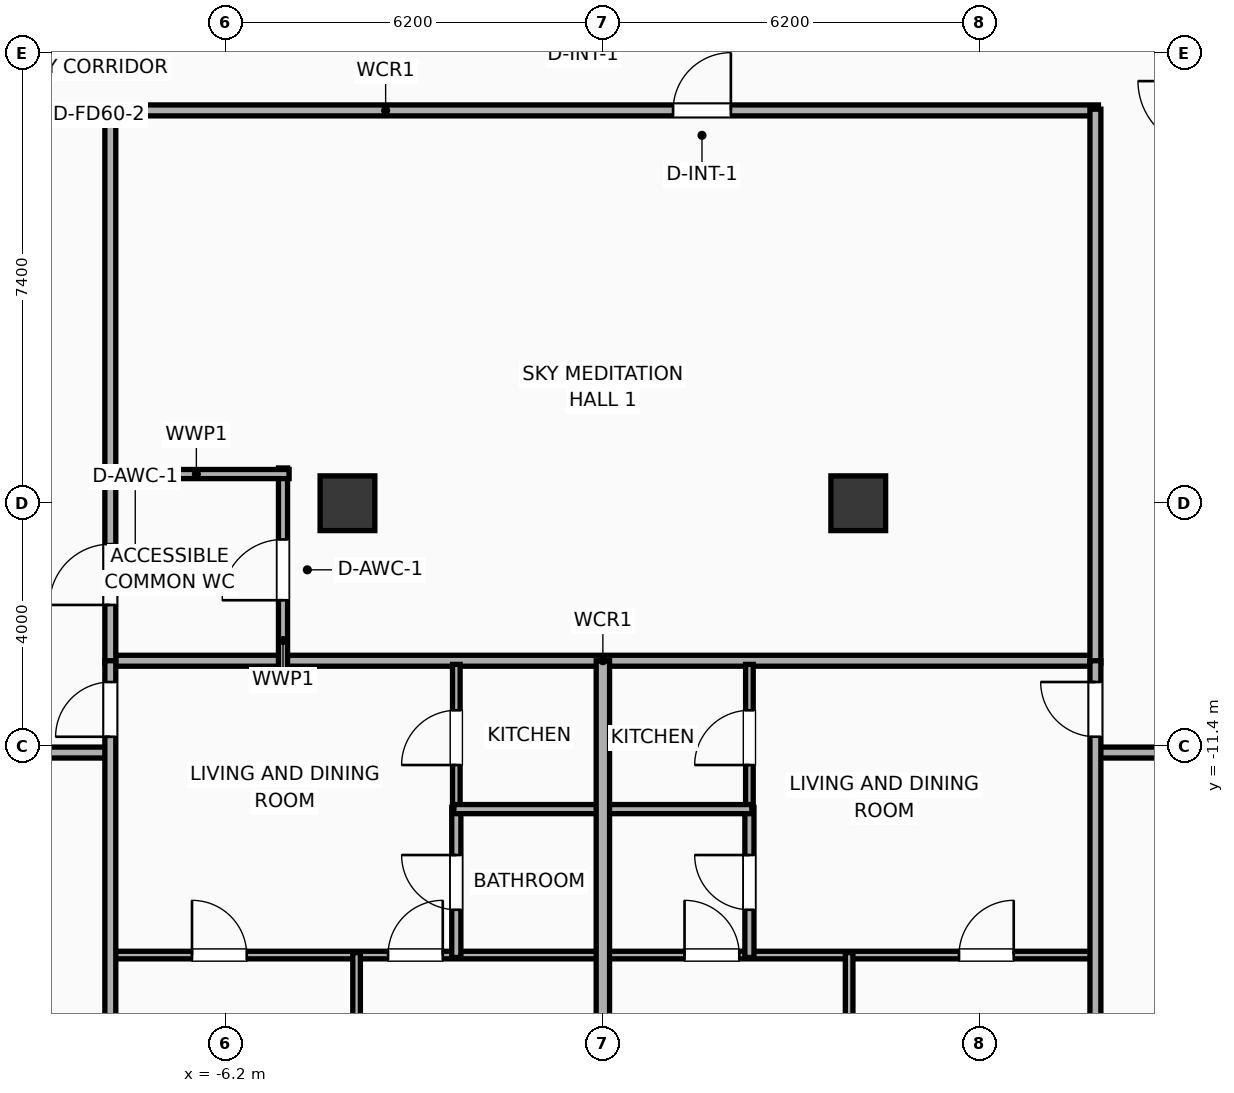
"""IFC4 building model, lengths in metres.
Left out: names, types, materials, properties, quantities, classifications, styles, units other than length and angle.
Written with IfcOpenShell. Run it as: python <this file> out.ifc"""

import sys

from ifc_helpers import new_model, si_unit, direction, frame, frame_2d, origin, origin_2d, place, context, subcontext, project, spatial, rectangle, extrude, element, fill, save


model = new_model("IFC4")
c1 = context("Model", 3, precision=1e-05, world=origin(), true_north=direction((0.0, 1.0)))
c2 = subcontext(c1, "Body", "Model", "MODEL_VIEW")
j1 = project(units=[si_unit("LENGTHUNIT", "METRE"), si_unit("PLANEANGLEUNIT", "RADIAN")], contexts=[c1])
p1 = place(None, origin())
s1 = spatial("IfcSite", under=j1, at=p1, CompositionType="ELEMENT")
p2 = place(p1, origin())
s2 = spatial("IfcBuilding", under=s1, at=p2, CompositionType="ELEMENT")
p3 = place(p2, frame((0.0, 0.0, 171.6)))
s3 = spatial("IfcBuildingStorey", under=s2, at=p3, CompositionType="ELEMENT", Elevation=171.6)
for number, where, z_axis, x_axis in (
    (1, (-4.2, -7.4, 0.0), (0.0, 0.0, 1.0), (1.0, 0.0, 0.0)),
    (2, (4.2, -7.4, 0.0), (0.0, 0.0, 1.0), (1.0, 0.0, 0.0)),
):
    element("IfcColumn", number, at=place(p3, frame(where, z_axis=z_axis, x_axis=x_axis)), inside=s3, PredefinedType="COLUMN", context=c2, shape_type="SweptSolid", body=[
        extrude(rectangle(XDim=0.9, YDim=0.9, at=origin_2d()), origin(), (0.0, 0.0, 1.0), 3.9),
    ])
p4 = place(p3, frame((-8.15, -9.99, 0.0), z_axis=(0.0, 0.0, 1.0), x_axis=(1.0, 0.0, 0.0)))
e3 = element("IfcWall", 3, at=p4, inside=s3, PredefinedType="PARTITIONING", context=c2, shape_type="SweptSolid", body=[
    extrude(rectangle(XDim=16.3, YDim=0.18, at=frame_2d((8.15, 0.0))), origin(), (0.0, 0.0, 1.0), 3.65),
])
p5 = place(p3, frame((-8.15, -0.94, 0.0), z_axis=(0.0, 0.0, 1.0), x_axis=(1.0, 0.0, 0.0)))
e4 = element("IfcWall", 4, at=p5, inside=s3, PredefinedType="PARTITIONING", context=c2, shape_type="SweptSolid", body=[
    extrude(rectangle(XDim=16.3, YDim=0.18, at=frame_2d((8.15, 0.0))), origin(), (0.0, 0.0, 1.0), 3.65),
])
p6 = place(p5, frame((9.305, 0.0, 0.0)))
e5 = element("IfcOpeningElement", 5, at=p6, cuts=e4, PredefinedType="OPENING", context=c2, shape_type="SweptSolid", body=[
    extrude(rectangle(XDim=0.95, YDim=2.05, at=frame_2d((0.475, 1.025))), frame((0.0, 0.1, 0.0), z_axis=(0.0, -1.0, 0.0), x_axis=(1.0, 0.0, 0.0)), (0.0, 0.0, 1.0), 0.2),
])
p7 = place(p3, frame((-8.1, -10.03, 0.0), z_axis=(0.0, 0.0, 1.0), x_axis=(0.0, 1.0, 0.0)))
e6 = element("IfcWall", 6, at=p7, inside=s3, PredefinedType="PARTITIONING", context=c2, shape_type="SweptSolid", body=[
    extrude(rectangle(XDim=9.11, YDim=0.18, at=frame_2d((4.555, 0.0))), origin(), (0.0, 0.0, 1.0), 3.65),
])
p8 = place(p7, frame((0.958, 0.0, 0.0)))
e7 = element("IfcOpeningElement", 7, at=p8, cuts=e6, PredefinedType="OPENING", context=c2, shape_type="SweptSolid", body=[
    extrude(rectangle(XDim=1.0, YDim=2.05, at=frame_2d((0.5, 1.025))), frame((0.0, 0.1, 0.0), z_axis=(0.0, -1.0, 0.0), x_axis=(1.0, 0.0, 0.0)), (0.0, 0.0, 1.0), 0.2),
])
p9 = place(p3, frame((8.1, -10.03, 0.0), z_axis=(0.0, 0.0, 1.0), x_axis=(0.0, 1.0, 0.0)))
e8 = element("IfcWall", 8, at=p9, inside=s3, PredefinedType="PARTITIONING", context=c2, shape_type="SweptSolid", body=[
    extrude(rectangle(XDim=9.11, YDim=0.18, at=frame_2d((4.555, 0.0))), origin(), (0.0, 0.0, 1.0), 3.65),
])
p10 = place(p3, frame((-5.26, -10.17, 0.0), z_axis=(0.0, 0.0, 1.0), x_axis=(0.0, 1.0, 0.0)))
e9 = element("IfcWall", 9, at=p10, inside=s3, PredefinedType="PLUMBINGWALL", context=c2, shape_type="SweptSolid", body=[
    extrude(rectangle(XDim=3.35, YDim=0.15, at=frame_2d((1.675, 0.0))), origin(), (0.0, 0.0, 1.0), 3.65),
])
p11 = place(p10, frame((1.175, 0.0, 0.0)))
e10 = element("IfcOpeningElement", 10, at=p11, cuts=e9, PredefinedType="OPENING", context=c2, shape_type="SweptSolid", body=[
    extrude(rectangle(XDim=1.0, YDim=2.05, at=frame_2d((0.5, 1.025))), frame((0.0, 0.085, 0.0), z_axis=(0.0, -1.0, 0.0), x_axis=(1.0, 0.0, 0.0)), (0.0, 0.0, 1.0), 0.17),
])
p12 = place(p3, frame((-8.21, -6.92, 0.0), z_axis=(0.0, 0.0, 1.0), x_axis=(1.0, 0.0, 0.0)))
e11 = element("IfcWall", 11, at=p12, inside=s3, PredefinedType="PLUMBINGWALL", context=c2, shape_type="SweptSolid", body=[
    extrude(rectangle(XDim=3.05, YDim=0.15, at=frame_2d((1.525, 0.0))), origin(), (0.0, 0.0, 1.0), 3.65),
])
p13 = place(p3, frame((-19.5, -11.5, 0.0), z_axis=(0.0, 0.0, 1.0), x_axis=(1.0, 0.0, 0.0)))
e12 = element("IfcWall", 12, at=p13, inside=s3, PredefinedType="PARTITIONING", context=c2, shape_type="SweptSolid", body=[
    extrude(rectangle(XDim=11.42, YDim=0.18, at=frame_2d((5.71, 0.0))), origin(), (0.0, 0.0, 1.0), 3.65),
])
p14 = place(p13, frame((2.623, 0.0, 0.0)))
e13 = element("IfcOpeningElement", 13, at=p14, cuts=e12, PredefinedType="OPENING", context=c2, shape_type="SweptSolid", body=[
    extrude(rectangle(XDim=0.9, YDim=2.05, at=frame_2d((0.45, 1.025))), frame((0.0, 0.1, 0.0), z_axis=(0.0, -1.0, 0.0), x_axis=(1.0, 0.0, 0.0)), (0.0, 0.0, 1.0), 0.2),
])
p15 = place(p13, frame((9.189, 0.0, 0.0)))
e14 = element("IfcOpeningElement", 14, at=p15, cuts=e12, PredefinedType="OPENING", context=c2, shape_type="SweptSolid", body=[
    extrude(rectangle(XDim=1.15, YDim=2.05, at=frame_2d((0.575, 1.025))), frame((0.0, 0.1, 0.0), z_axis=(0.0, -1.0, 0.0), x_axis=(1.0, 0.0, 0.0)), (0.0, 0.0, 1.0), 0.2),
])
p16 = place(p3, frame((8.08, -11.5, 0.0), z_axis=(0.0, 0.0, 1.0), x_axis=(1.0, 0.0, 0.0)))
e15 = element("IfcWall", 15, at=p16, inside=s3, PredefinedType="PARTITIONING", context=c2, shape_type="SweptSolid", body=[
    extrude(rectangle(XDim=11.42, YDim=0.18, at=frame_2d((5.71, 0.0))), origin(), (0.0, 0.0, 1.0), 3.65),
])
p17 = place(p16, frame((1.175, 0.0, 0.0)))
e16 = element("IfcOpeningElement", 16, at=p17, cuts=e15, PredefinedType="OPENING", context=c2, shape_type="SweptSolid", body=[
    extrude(rectangle(XDim=1.15, YDim=2.05, at=frame_2d((0.575, 1.025))), frame((0.0, 0.1, 0.0), z_axis=(0.0, -1.0, 0.0), x_axis=(1.0, 0.0, 0.0)), (0.0, 0.0, 1.0), 0.2),
])
p18 = place(p16, frame((6.87, 0.0, 0.0)))
e17 = element("IfcOpeningElement", 17, at=p18, cuts=e15, PredefinedType="OPENING", context=c2, shape_type="SweptSolid", body=[
    extrude(rectangle(XDim=1.15, YDim=2.05, at=frame_2d((0.575, 1.025))), frame((0.0, 0.1, 0.0), z_axis=(0.0, -1.0, 0.0), x_axis=(1.0, 0.0, 0.0)), (0.0, 0.0, 1.0), 0.2),
])
p19 = place(p3, frame((-8.08, -14.83, 0.0), z_axis=(0.0, 0.0, 1.0), x_axis=(1.0, 0.0, 0.0)))
e18 = element("IfcWall", 18, at=p19, inside=s3, PredefinedType="PARTITIONING", context=c2, shape_type="SweptSolid", body=[
    extrude(rectangle(XDim=8.06, YDim=0.125, at=frame_2d((4.03, 0.0))), origin(), (0.0, 0.0, 1.0), 3.65),
])
p20 = place(p19, frame((1.323, 0.0, 0.0)))
e19 = element("IfcOpeningElement", 19, at=p20, cuts=e18, PredefinedType="OPENING", context=c2, shape_type="SweptSolid", body=[
    extrude(rectangle(XDim=0.9, YDim=2.05, at=frame_2d((0.45, 1.025))), frame((0.0, 0.073, 0.0), z_axis=(0.0, -1.0, 0.0), x_axis=(1.0, 0.0, 0.0)), (0.0, 0.0, 1.0), 0.145),
])
p21 = place(p19, frame((4.547, 0.0, 0.0)))
e20 = element("IfcOpeningElement", 20, at=p21, cuts=e18, PredefinedType="OPENING", context=c2, shape_type="SweptSolid", body=[
    extrude(rectangle(XDim=0.9, YDim=2.05, at=frame_2d((0.45, 1.025))), frame((0.0, 0.073, 0.0), z_axis=(0.0, -1.0, 0.0), x_axis=(1.0, 0.0, 0.0)), (0.0, 0.0, 1.0), 0.145),
])
p22 = place(p3, frame((-2.41, -12.46, 0.0), z_axis=(0.0, 0.0, 1.0), x_axis=(0.0, 1.0, 0.0)))
e21 = element("IfcWall", 21, at=p22, inside=s3, PredefinedType="PARTITIONING", context=c2, shape_type="SweptSolid", body=[
    extrude(rectangle(XDim=2.41, YDim=0.125, at=frame_2d((1.205, 0.0))), origin(), (0.0, 0.0, 1.0), 3.65),
])
p23 = place(p22, frame((0.755, 0.0, 0.0)))
e22 = element("IfcOpeningElement", 22, at=p23, cuts=e21, PredefinedType="OPENING", context=c2, shape_type="SweptSolid", body=[
    extrude(rectangle(XDim=0.9, YDim=2.05, at=frame_2d((0.45, 1.025))), frame((0.0, 0.073, 0.0), z_axis=(0.0, -1.0, 0.0), x_axis=(1.0, 0.0, 0.0)), (0.0, 0.0, 1.0), 0.145),
])
p24 = place(p3, frame((-2.41, -14.87, 0.0), z_axis=(0.0, 0.0, 1.0), x_axis=(0.0, 1.0, 0.0)))
e23 = element("IfcWall", 23, at=p24, inside=s3, PredefinedType="PLUMBINGWALL", context=c2, shape_type="SweptSolid", body=[
    extrude(rectangle(XDim=2.47, YDim=0.15, at=frame_2d((1.235, 0.0))), origin(), (0.0, 0.0, 1.0), 3.65),
])
p25 = place(p24, frame((0.785, 0.0, 0.0)))
e24 = element("IfcOpeningElement", 24, at=p25, cuts=e23, PredefinedType="OPENING", context=c2, shape_type="SweptSolid", body=[
    extrude(rectangle(XDim=0.9, YDim=2.05, at=frame_2d((0.45, 1.025))), frame((0.0, 0.085, 0.0), z_axis=(0.0, -1.0, 0.0), x_axis=(1.0, 0.0, 0.0)), (0.0, 0.0, 1.0), 0.17),
])
p26 = place(p3, frame((-2.45, -12.43, 0.0), z_axis=(0.0, 0.0, 1.0), x_axis=(1.0, 0.0, 0.0)))
e25 = element("IfcWall", 25, at=p26, inside=s3, PredefinedType="PLUMBINGWALL", context=c2, shape_type="SweptSolid", body=[
    extrude(rectangle(XDim=2.43, YDim=0.15, at=frame_2d((1.215, 0.0))), origin(), (0.0, 0.0, 1.0), 3.65),
])
p27 = place(p3, frame((-4.05, -21.031, 0.0), z_axis=(0.0, 0.0, 1.0), x_axis=(0.0, 1.0, 0.0)))
e26 = element("IfcWall", 26, at=p27, inside=s3, PredefinedType="PARTITIONING", context=c2, shape_type="SweptSolid", body=[
    extrude(rectangle(XDim=6.241, YDim=0.125, at=frame_2d((3.12, 0.0))), origin(), (0.0, 0.0, 1.0), 3.65),
])
p28 = place(p3, frame((-8.1, -21.456, 0.0), z_axis=(0.0, 0.0, 1.0), x_axis=(0.0, 1.0, 0.0)))
e27 = element("IfcWall", 27, at=p28, inside=s3, PredefinedType="PARTITIONING", context=c2, shape_type="SweptSolid", body=[
    extrude(rectangle(XDim=11.466, YDim=0.18, at=frame_2d((5.733, 0.0))), origin(), (0.0, 0.0, 1.0), 3.65),
])
p29 = place(p28, frame((10.216, 0.0, 0.0)))
e28 = element("IfcOpeningElement", 28, at=p29, cuts=e27, PredefinedType="OPENING", context=c2, shape_type="SweptSolid", body=[
    extrude(rectangle(XDim=0.9, YDim=2.05, at=frame_2d((0.45, 1.025))), frame((0.0, 0.1, 0.0), z_axis=(0.0, -1.0, 0.0), x_axis=(1.0, 0.0, 0.0)), (0.0, 0.0, 1.0), 0.2),
])
p30 = place(p3, frame((0.02, -14.83, 0.0), z_axis=(0.0, 0.0, 1.0), x_axis=(1.0, 0.0, 0.0)))
e29 = element("IfcWall", 29, at=p30, inside=s3, PredefinedType="PARTITIONING", context=c2, shape_type="SweptSolid", body=[
    extrude(rectangle(XDim=8.06, YDim=0.125, at=frame_2d((4.03, 0.0))), origin(), (0.0, 0.0, 1.0), 3.65),
])
p31 = place(p30, frame((1.323, 0.0, 0.0)))
e30 = element("IfcOpeningElement", 30, at=p31, cuts=e29, PredefinedType="OPENING", context=c2, shape_type="SweptSolid", body=[
    extrude(rectangle(XDim=0.9, YDim=2.05, at=frame_2d((0.45, 1.025))), frame((0.0, 0.073, 0.0), z_axis=(0.0, -1.0, 0.0), x_axis=(1.0, 0.0, 0.0)), (0.0, 0.0, 1.0), 0.145),
])
p32 = place(p30, frame((5.837, 0.0, 0.0)))
e31 = element("IfcOpeningElement", 31, at=p32, cuts=e29, PredefinedType="OPENING", context=c2, shape_type="SweptSolid", body=[
    extrude(rectangle(XDim=0.9, YDim=2.05, at=frame_2d((0.45, 1.025))), frame((0.0, 0.073, 0.0), z_axis=(0.0, -1.0, 0.0), x_axis=(1.0, 0.0, 0.0)), (0.0, 0.0, 1.0), 0.145),
])
p33 = place(p3, frame((2.41, -12.46, 0.0), z_axis=(0.0, 0.0, 1.0), x_axis=(0.0, 1.0, 0.0)))
e32 = element("IfcWall", 32, at=p33, inside=s3, PredefinedType="PARTITIONING", context=c2, shape_type="SweptSolid", body=[
    extrude(rectangle(XDim=2.41, YDim=0.125, at=frame_2d((1.205, 0.0))), origin(), (0.0, 0.0, 1.0), 3.65),
])
p34 = place(p33, frame((0.755, 0.0, 0.0)))
e33 = element("IfcOpeningElement", 33, at=p34, cuts=e32, PredefinedType="OPENING", context=c2, shape_type="SweptSolid", body=[
    extrude(rectangle(XDim=0.9, YDim=2.05, at=frame_2d((0.45, 1.025))), frame((0.0, 0.073, 0.0), z_axis=(0.0, -1.0, 0.0), x_axis=(1.0, 0.0, 0.0)), (0.0, 0.0, 1.0), 0.145),
])
p35 = place(p3, frame((2.41, -14.87, 0.0), z_axis=(0.0, 0.0, 1.0), x_axis=(0.0, 1.0, 0.0)))
e34 = element("IfcWall", 34, at=p35, inside=s3, PredefinedType="PLUMBINGWALL", context=c2, shape_type="SweptSolid", body=[
    extrude(rectangle(XDim=2.47, YDim=0.15, at=frame_2d((1.235, 0.0))), origin(), (0.0, 0.0, 1.0), 3.65),
])
p36 = place(p35, frame((0.785, 0.0, 0.0)))
e35 = element("IfcOpeningElement", 35, at=p36, cuts=e34, PredefinedType="OPENING", context=c2, shape_type="SweptSolid", body=[
    extrude(rectangle(XDim=0.9, YDim=2.05, at=frame_2d((0.45, 1.025))), frame((0.0, 0.085, 0.0), z_axis=(0.0, -1.0, 0.0), x_axis=(1.0, 0.0, 0.0)), (0.0, 0.0, 1.0), 0.17),
])
p37 = place(p3, frame((0.02, -12.43, 0.0), z_axis=(0.0, 0.0, 1.0), x_axis=(1.0, 0.0, 0.0)))
e36 = element("IfcWall", 36, at=p37, inside=s3, PredefinedType="PLUMBINGWALL", context=c2, shape_type="SweptSolid", body=[
    extrude(rectangle(XDim=2.43, YDim=0.15, at=frame_2d((1.215, 0.0))), origin(), (0.0, 0.0, 1.0), 3.65),
])
p38 = place(p3, frame((4.05, -20.179, 0.0), z_axis=(0.0, 0.0, 1.0), x_axis=(0.0, 1.0, 0.0)))
e37 = element("IfcWall", 37, at=p38, inside=s3, PredefinedType="PARTITIONING", context=c2, shape_type="SweptSolid", body=[
    extrude(rectangle(XDim=5.389, YDim=0.125, at=frame_2d((2.695, 0.0))), origin(), (0.0, 0.0, 1.0), 3.04),
])
p39 = place(p3, frame((8.1, -19.754, 0.0), z_axis=(0.0, 0.0, 1.0), x_axis=(0.0, 1.0, 0.0)))
e38 = element("IfcWall", 38, at=p39, inside=s3, PredefinedType="PARTITIONING", context=c2, shape_type="SweptSolid", body=[
    extrude(rectangle(XDim=9.764, YDim=0.18, at=frame_2d((4.882, 0.0))), origin(), (0.0, 0.0, 1.0), 3.65),
])
p40 = place(p39, frame((8.514, 0.0, 0.0)))
e39 = element("IfcOpeningElement", 39, at=p40, cuts=e38, PredefinedType="OPENING", context=c2, shape_type="SweptSolid", body=[
    extrude(rectangle(XDim=0.9, YDim=2.05, at=frame_2d((0.45, 1.025))), frame((0.0, 0.1, 0.0), z_axis=(0.0, -1.0, 0.0), x_axis=(1.0, 0.0, 0.0)), (0.0, 0.0, 1.0), 0.2),
])
p41 = place(p3, frame((0.0, -20.605, 0.0), z_axis=(0.0, 0.0, 1.0), x_axis=(0.0, 1.0, 0.0)))
e40 = element("IfcWall", 40, at=p41, inside=s3, PredefinedType="PARTITIONING", context=c2, shape_type="SweptSolid", body=[
    extrude(rectangle(XDim=10.615, YDim=0.22, at=frame_2d((5.308, 0.0))), origin(), (0.0, 0.0, 1.0), 3.65),
])
p42 = place(p6, origin())
e41 = element("IfcDoor", 41, at=p42, inside=s3, OperationType="SINGLE_SWING_RIGHT", PredefinedType="DOOR", context=c2, shape_type="SweptSolid", body=[
    extrude(rectangle(XDim=0.95, YDim=2.05, at=frame_2d((0.475, 1.025))), frame((0.0, 0.025, 0.0), z_axis=(0.0, -1.0, 0.0), x_axis=(1.0, 0.0, 0.0)), (0.0, 0.0, 1.0), 0.05),
])
fill(e5, e41)
p43 = place(p8, origin())
e42 = element("IfcDoor", 42, at=p43, inside=s3, OperationType="SINGLE_SWING_LEFT", PredefinedType="DOOR", context=c2, shape_type="SweptSolid", body=[
    extrude(rectangle(XDim=1.0, YDim=2.05, at=frame_2d((0.5, 1.025))), frame((0.0, 0.025, 0.0), z_axis=(0.0, -1.0, 0.0), x_axis=(1.0, 0.0, 0.0)), (0.0, 0.0, 1.0), 0.05),
])
fill(e7, e42)
p44 = place(p11, origin())
e43 = element("IfcDoor", 43, at=p44, inside=s3, OperationType="SINGLE_SWING_LEFT", PredefinedType="DOOR", context=c2, shape_type="SweptSolid", body=[
    extrude(rectangle(XDim=1.0, YDim=2.05, at=frame_2d((0.5, 1.025))), frame((0.0, 0.025, 0.0), z_axis=(0.0, -1.0, 0.0), x_axis=(1.0, 0.0, 0.0)), (0.0, 0.0, 1.0), 0.05),
])
fill(e10, e43)
p45 = place(p20, origin())
e44 = element("IfcDoor", 44, at=p45, inside=s3, OperationType="SINGLE_SWING_LEFT", PredefinedType="DOOR", context=c2, shape_type="SweptSolid", body=[
    extrude(rectangle(XDim=0.9, YDim=2.05, at=frame_2d((0.45, 1.025))), frame((0.0, 0.025, 0.0), z_axis=(0.0, -1.0, 0.0), x_axis=(1.0, 0.0, 0.0)), (0.0, 0.0, 1.0), 0.05),
])
fill(e19, e44)
p46 = place(p21, origin())
e45 = element("IfcDoor", 45, at=p46, inside=s3, OperationType="SINGLE_SWING_RIGHT", PredefinedType="DOOR", context=c2, shape_type="SweptSolid", body=[
    extrude(rectangle(XDim=0.9, YDim=2.05, at=frame_2d((0.45, 1.025))), frame((0.0, 0.025, 0.0), z_axis=(0.0, -1.0, 0.0), x_axis=(1.0, 0.0, 0.0)), (0.0, 0.0, 1.0), 0.05),
])
fill(e20, e45)
p47 = place(p23, origin())
e46 = element("IfcDoor", 46, at=p47, inside=s3, OperationType="SINGLE_SWING_LEFT", PredefinedType="DOOR", context=c2, shape_type="SweptSolid", body=[
    extrude(rectangle(XDim=0.9, YDim=2.05, at=frame_2d((0.45, 1.025))), frame((0.0, 0.025, 0.0), z_axis=(0.0, -1.0, 0.0), x_axis=(1.0, 0.0, 0.0)), (0.0, 0.0, 1.0), 0.05),
])
fill(e22, e46)
p48 = place(p25, origin())
e47 = element("IfcDoor", 47, at=p48, inside=s3, OperationType="SINGLE_SWING_RIGHT", PredefinedType="DOOR", context=c2, shape_type="SweptSolid", body=[
    extrude(rectangle(XDim=0.9, YDim=2.05, at=frame_2d((0.45, 1.025))), frame((0.0, 0.025, 0.0), z_axis=(0.0, -1.0, 0.0), x_axis=(1.0, 0.0, 0.0)), (0.0, 0.0, 1.0), 0.05),
])
fill(e24, e47)
p49 = place(p29, origin())
e48 = element("IfcDoor", 48, at=p49, inside=s3, OperationType="SINGLE_SWING_LEFT", PredefinedType="DOOR", context=c2, shape_type="SweptSolid", body=[
    extrude(rectangle(XDim=0.9, YDim=2.05, at=frame_2d((0.45, 1.025))), frame((0.0, 0.025, 0.0), z_axis=(0.0, -1.0, 0.0), x_axis=(1.0, 0.0, 0.0)), (0.0, 0.0, 1.0), 0.05),
])
fill(e28, e48)
p50 = place(p31, origin())
e49 = element("IfcDoor", 49, at=p50, inside=s3, OperationType="SINGLE_SWING_LEFT", PredefinedType="DOOR", context=c2, shape_type="SweptSolid", body=[
    extrude(rectangle(XDim=0.9, YDim=2.05, at=frame_2d((0.45, 1.025))), frame((0.0, 0.025, 0.0), z_axis=(0.0, -1.0, 0.0), x_axis=(1.0, 0.0, 0.0)), (0.0, 0.0, 1.0), 0.05),
])
fill(e30, e49)
p51 = place(p32, origin())
e50 = element("IfcDoor", 50, at=p51, inside=s3, OperationType="SINGLE_SWING_RIGHT", PredefinedType="DOOR", context=c2, shape_type="SweptSolid", body=[
    extrude(rectangle(XDim=0.9, YDim=2.05, at=frame_2d((0.45, 1.025))), frame((0.0, 0.025, 0.0), z_axis=(0.0, -1.0, 0.0), x_axis=(1.0, 0.0, 0.0)), (0.0, 0.0, 1.0), 0.05),
])
fill(e31, e50)
p52 = place(p34, origin())
e51 = element("IfcDoor", 51, at=p52, inside=s3, OperationType="SINGLE_SWING_LEFT", PredefinedType="DOOR", context=c2, shape_type="SweptSolid", body=[
    extrude(rectangle(XDim=0.9, YDim=2.05, at=frame_2d((0.45, 1.025))), frame((0.0, 0.025, 0.0), z_axis=(0.0, -1.0, 0.0), x_axis=(1.0, 0.0, 0.0)), (0.0, 0.0, 1.0), 0.05),
])
fill(e33, e51)
p53 = place(p36, origin())
e52 = element("IfcDoor", 52, at=p53, inside=s3, OperationType="SINGLE_SWING_RIGHT", PredefinedType="DOOR", context=c2, shape_type="SweptSolid", body=[
    extrude(rectangle(XDim=0.9, YDim=2.05, at=frame_2d((0.45, 1.025))), frame((0.0, 0.025, 0.0), z_axis=(0.0, -1.0, 0.0), x_axis=(1.0, 0.0, 0.0)), (0.0, 0.0, 1.0), 0.05),
])
fill(e35, e52)
p54 = place(p40, origin())
e53 = element("IfcDoor", 53, at=p54, inside=s3, OperationType="SINGLE_SWING_RIGHT", PredefinedType="DOOR", context=c2, shape_type="SweptSolid", body=[
    extrude(rectangle(XDim=0.9, YDim=2.05, at=frame_2d((0.45, 1.025))), frame((0.0, 0.025, 0.0), z_axis=(0.0, -1.0, 0.0), x_axis=(1.0, 0.0, 0.0)), (0.0, 0.0, 1.0), 0.05),
])
fill(e39, e53)
save(model, sys.argv[1])
